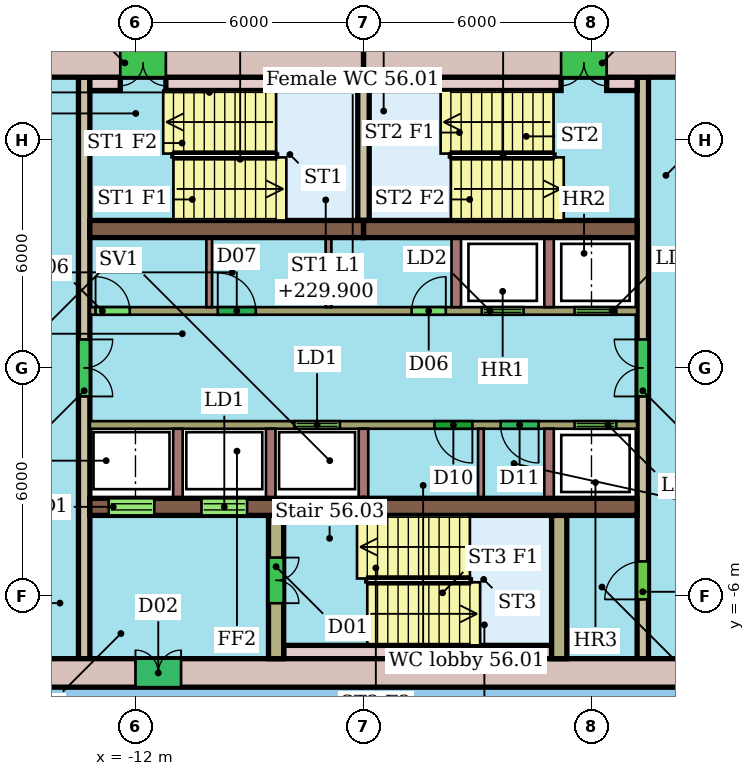
"""IFC4 building model, lengths in metres.
Left out: names, types, materials, properties, quantities, classifications, styles, units other than length and angle.
Written with IfcOpenShell. Run it as: python <this file> out.ifc"""

import sys

from ifc_helpers import new_model, si_unit, direction, frame, frame_2d, origin, place, context, subcontext, project, spatial, rectangle, extrude, element, fill, save


model = new_model("IFC4")
c1 = context("Model", 3, precision=1e-05, world=origin(), true_north=direction((0.0, 1.0)))
c2 = subcontext(c1, "Body", "Model", "MODEL_VIEW")
j1 = project(units=[si_unit("LENGTHUNIT", "METRE"), si_unit("PLANEANGLEUNIT", "RADIAN")], contexts=[c1])
p1 = place(None, origin())
s1 = spatial("IfcSite", under=j1, at=p1, CompositionType="ELEMENT")
p2 = place(p1, origin())
s2 = spatial("IfcBuilding", under=s1, at=p2, CompositionType="ELEMENT")
p3 = place(p2, frame((0.0, 0.0, 228.1)))
s3 = spatial("IfcBuildingStorey", under=s2, at=p3, CompositionType="ELEMENT", Elevation=228.1)
p4 = place(p3, frame((4.8, 8.025, 0.0), z_axis=(0.0, 0.0, 1.0), x_axis=(-1.0, 0.0, 0.0)))
e1 = element("IfcWall", 1, at=p4, inside=s3, PredefinedType="SHEAR", context=c2, shape_type="SweptSolid", body=[
    extrude(rectangle(XDim=10.8, YDim=0.75, at=frame_2d((5.4, 0.0))), origin(), (0.0, 0.0, 1.0), 3.3),
])
p5 = place(p4, frame((4.4, 0.0, 0.0)))
e2 = element("IfcOpeningElement", 2, at=p5, cuts=e1, PredefinedType="OPENING", context=c2, shape_type="SweptSolid", body=[
    extrude(rectangle(XDim=1.2, YDim=2.1, at=frame_2d((0.6, 1.05))), frame((0.0, 0.385, 0.0), z_axis=(0.0, -1.0, 0.0), x_axis=(1.0, 0.0, 0.0)), (0.0, 0.0, 1.0), 0.77),
])
p6 = place(p3, frame((-6.0, 8.025, 0.0), z_axis=(0.0, 0.0, 1.0), x_axis=(-1.0, 0.0, 0.0)))
e3 = element("IfcWall", 3, at=p6, inside=s3, PredefinedType="SHEAR", context=c2, shape_type="SweptSolid", body=[
    extrude(rectangle(XDim=10.8, YDim=0.75, at=frame_2d((5.4, 0.0))), origin(), (0.0, 0.0, 1.0), 3.3),
])
p7 = place(p6, frame((5.2, 0.0, 0.0)))
e4 = element("IfcOpeningElement", 4, at=p7, cuts=e3, PredefinedType="OPENING", context=c2, shape_type="SweptSolid", body=[
    extrude(rectangle(XDim=1.2, YDim=2.1, at=frame_2d((0.6, 1.05))), frame((0.0, 0.385, 0.0), z_axis=(0.0, -1.0, 0.0), x_axis=(1.0, 0.0, 0.0)), (0.0, 0.0, 1.0), 0.77),
])
p8 = place(p3, frame((-16.8, -8.025, 0.0), z_axis=(0.0, 0.0, 1.0), x_axis=(1.0, 0.0, 0.0)))
e5 = element("IfcWall", 5, at=p8, inside=s3, PredefinedType="SHEAR", context=c2, shape_type="SweptSolid", body=[
    extrude(rectangle(XDim=21.6, YDim=0.75, at=frame_2d((10.8, 0.0))), origin(), (0.0, 0.0, 1.0), 3.3),
])
p9 = place(p8, frame((4.8, 0.0, 0.0)))
e6 = element("IfcOpeningElement", 6, at=p9, cuts=e5, PredefinedType="OPENING", context=c2, shape_type="SweptSolid", body=[
    extrude(rectangle(XDim=1.2, YDim=2.1, at=frame_2d((0.6, 1.05))), frame((0.0, 0.385, 0.0), z_axis=(0.0, -1.0, 0.0), x_axis=(1.0, 0.0, 0.0)), (0.0, 0.0, 1.0), 0.77),
])
for number, where, z_axis, x_axis in (
    (7, (-13.2, 3.655, 0.0), (0.0, 0.0, 1.0), (1.0, 0.0, 0.0)),
    (8, (-6.0, 3.655, 0.0), (0.0, 0.0, 1.0), (1.0, 0.0, 0.0)),
):
    element("IfcWall", number, at=place(p3, frame(where, z_axis=z_axis, x_axis=x_axis)), inside=s3, PredefinedType="SHEAR", context=c2, shape_type="SweptSolid", body=[
        extrude(rectangle(XDim=7.2, YDim=0.45, at=frame_2d((3.6, 0.0))), origin(), (0.0, 0.0, 1.0), 3.3),
    ])
p10 = place(p3, frame((-13.2, -3.655, 0.0), z_axis=(0.0, 0.0, 1.0), x_axis=(1.0, 0.0, 0.0)))
e9 = element("IfcWall", 9, at=p10, inside=s3, PredefinedType="SHEAR", context=c2, shape_type="SweptSolid", body=[
    extrude(rectangle(XDim=7.2, YDim=0.45, at=frame_2d((3.6, 0.0))), origin(), (0.0, 0.0, 1.0), 3.3),
])
p11 = place(p10, frame((0.496, 0.0, 0.0)))
e10 = element("IfcOpeningElement", 10, at=p11, cuts=e9, PredefinedType="OPENING", context=c2, shape_type="SweptSolid", body=[
    extrude(rectangle(XDim=1.2, YDim=2.1, at=frame_2d((0.6, 1.05))), frame((0.0, 0.235, 0.0), z_axis=(0.0, -1.0, 0.0), x_axis=(1.0, 0.0, 0.0)), (0.0, 0.0, 1.0), 0.47),
])
p12 = place(p10, frame((2.938, 0.0, 0.0)))
e11 = element("IfcOpeningElement", 11, at=p12, cuts=e9, PredefinedType="OPENING", context=c2, shape_type="SweptSolid", body=[
    extrude(rectangle(XDim=1.2, YDim=2.1, at=frame_2d((0.6, 1.05))), frame((0.0, 0.235, 0.0), z_axis=(0.0, -1.0, 0.0), x_axis=(1.0, 0.0, 0.0)), (0.0, 0.0, 1.0), 0.47),
])
p13 = place(p3, frame((-6.0, -3.655, 0.0), z_axis=(0.0, 0.0, 1.0), x_axis=(1.0, 0.0, 0.0)))
e12 = element("IfcWall", 12, at=p13, inside=s3, PredefinedType="SHEAR", context=c2, shape_type="SweptSolid", body=[
    extrude(rectangle(XDim=7.2, YDim=0.45, at=frame_2d((3.6, 0.0))), origin(), (0.0, 0.0, 1.0), 3.3),
])
p14 = place(p3, frame((-13.35, 7.65, 0.0), z_axis=(0.0, 0.0, 1.0), x_axis=(0.0, -1.0, 0.0)))
e13 = element("IfcWall", 13, at=p14, inside=s3, PredefinedType="SHEAR", context=c2, shape_type="SweptSolid", body=[
    extrude(rectangle(XDim=15.3, YDim=0.3, at=frame_2d((7.65, 0.0))), origin(), (0.0, 0.0, 1.0), 3.3),
])
p15 = place(p14, frame((6.9, 0.0, 0.0)))
e14 = element("IfcOpeningElement", 14, at=p15, cuts=e13, PredefinedType="OPENING", context=c2, shape_type="SweptSolid", body=[
    extrude(rectangle(XDim=1.5, YDim=2.1, at=frame_2d((0.75, 1.05))), frame((0.0, 0.16, 0.0), z_axis=(0.0, -1.0, 0.0), x_axis=(1.0, 0.0, 0.0)), (0.0, 0.0, 1.0), 0.32),
])
p16 = place(p3, frame((1.35, -7.65, 0.0), z_axis=(0.0, 0.0, 1.0), x_axis=(0.0, 1.0, 0.0)))
e15 = element("IfcWall", 15, at=p16, inside=s3, PredefinedType="SHEAR", context=c2, shape_type="SweptSolid", body=[
    extrude(rectangle(XDim=15.3, YDim=0.3, at=frame_2d((7.65, 0.0))), origin(), (0.0, 0.0, 1.0), 3.3),
])
p17 = place(p16, frame((1.56, 0.0, 0.0)))
e16 = element("IfcOpeningElement", 16, at=p17, cuts=e15, PredefinedType="OPENING", context=c2, shape_type="SweptSolid", body=[
    extrude(rectangle(XDim=1.0, YDim=2.1, at=frame_2d((0.5, 1.05))), frame((0.0, 0.16, 0.0), z_axis=(0.0, -1.0, 0.0), x_axis=(1.0, 0.0, 0.0)), (0.0, 0.0, 1.0), 0.32),
])
p18 = place(p16, frame((6.9, 0.0, 0.0)))
e17 = element("IfcOpeningElement", 17, at=p18, cuts=e15, PredefinedType="OPENING", context=c2, shape_type="SweptSolid", body=[
    extrude(rectangle(XDim=1.5, YDim=2.1, at=frame_2d((0.75, 1.05))), frame((0.0, 0.16, 0.0), z_axis=(0.0, -1.0, 0.0), x_axis=(1.0, 0.0, 0.0)), (0.0, 0.0, 1.0), 0.32),
])
p19 = place(p3, frame((-13.2, 1.5, 0.0), z_axis=(0.0, 0.0, 1.0), x_axis=(1.0, 0.0, 0.0)))
e18 = element("IfcWall", 18, at=p19, inside=s3, PredefinedType="SHEAR", context=c2, shape_type="SweptSolid", body=[
    extrude(rectangle(XDim=14.4, YDim=0.2, at=frame_2d((7.2, 0.0))), origin(), (0.0, 0.0, 1.0), 3.3),
])
p20 = place(p19, frame((10.312, 0.0, 0.0)))
e19 = element("IfcOpeningElement", 19, at=p20, cuts=e18, PredefinedType="OPENING", context=c2, shape_type="SweptSolid", body=[
    extrude(rectangle(XDim=1.1, YDim=2.1, at=frame_2d((0.55, 1.05))), frame((0.0, 0.11, 0.0), z_axis=(0.0, -1.0, 0.0), x_axis=(1.0, 0.0, 0.0)), (0.0, 0.0, 1.0), 0.22),
])
p21 = place(p19, frame((12.754, 0.0, 0.0)))
e20 = element("IfcOpeningElement", 20, at=p21, cuts=e18, PredefinedType="OPENING", context=c2, shape_type="SweptSolid", body=[
    extrude(rectangle(XDim=1.1, YDim=2.1, at=frame_2d((0.55, 1.05))), frame((0.0, 0.11, 0.0), z_axis=(0.0, -1.0, 0.0), x_axis=(1.0, 0.0, 0.0)), (0.0, 0.0, 1.0), 0.22),
])
p22 = place(p19, frame((0.15, 0.0, 0.0)))
e21 = element("IfcOpeningElement", 21, at=p22, cuts=e18, PredefinedType="OPENING", context=c2, shape_type="SweptSolid", body=[
    extrude(rectangle(XDim=0.9, YDim=2.1, at=frame_2d((0.45, 1.05))), frame((0.0, 0.11, 0.0), z_axis=(0.0, -1.0, 0.0), x_axis=(1.0, 0.0, 0.0)), (0.0, 0.0, 1.0), 0.22),
])
p23 = place(p19, frame((3.365, 0.0, 0.0)))
e22 = element("IfcOpeningElement", 22, at=p23, cuts=e18, PredefinedType="OPENING", context=c2, shape_type="SweptSolid", body=[
    extrude(rectangle(XDim=1.0, YDim=2.1, at=frame_2d((0.5, 1.05))), frame((0.0, 0.11, 0.0), z_axis=(0.0, -1.0, 0.0), x_axis=(1.0, 0.0, 0.0)), (0.0, 0.0, 1.0), 0.22),
])
p24 = place(p19, frame((8.467, 0.0, 0.0)))
e23 = element("IfcOpeningElement", 23, at=p24, cuts=e18, PredefinedType="OPENING", context=c2, shape_type="SweptSolid", body=[
    extrude(rectangle(XDim=0.9, YDim=2.1, at=frame_2d((0.45, 1.05))), frame((0.0, 0.11, 0.0), z_axis=(0.0, -1.0, 0.0), x_axis=(1.0, 0.0, 0.0)), (0.0, 0.0, 1.0), 0.22),
])
p25 = place(p3, frame((1.2, -1.5, 0.0), z_axis=(0.0, 0.0, 1.0), x_axis=(-1.0, 0.0, 0.0)))
e24 = element("IfcWall", 24, at=p25, inside=s3, PredefinedType="SHEAR", context=c2, shape_type="SweptSolid", body=[
    extrude(rectangle(XDim=14.4, YDim=0.2, at=frame_2d((7.2, 0.0))), origin(), (0.0, 0.0, 1.0), 3.3),
])
p26 = place(p25, frame((7.821, 0.0, 0.0)))
e25 = element("IfcOpeningElement", 25, at=p26, cuts=e24, PredefinedType="OPENING", context=c2, shape_type="SweptSolid", body=[
    extrude(rectangle(XDim=1.2, YDim=2.1, at=frame_2d((0.6, 1.05))), frame((0.0, 0.11, 0.0), z_axis=(0.0, -1.0, 0.0), x_axis=(1.0, 0.0, 0.0)), (0.0, 0.0, 1.0), 0.22),
])
p27 = place(p25, frame((0.546, 0.0, 0.0)))
e26 = element("IfcOpeningElement", 26, at=p27, cuts=e24, PredefinedType="OPENING", context=c2, shape_type="SweptSolid", body=[
    extrude(rectangle(XDim=1.1, YDim=2.1, at=frame_2d((0.55, 1.05))), frame((0.0, 0.11, 0.0), z_axis=(0.0, -1.0, 0.0), x_axis=(1.0, 0.0, 0.0)), (0.0, 0.0, 1.0), 0.22),
])
p28 = place(p25, frame((4.335, 0.0, 0.0)))
e27 = element("IfcOpeningElement", 27, at=p28, cuts=e24, PredefinedType="OPENING", context=c2, shape_type="SweptSolid", body=[
    extrude(rectangle(XDim=1.0, YDim=2.1, at=frame_2d((0.5, 1.05))), frame((0.0, 0.11, 0.0), z_axis=(0.0, -1.0, 0.0), x_axis=(1.0, 0.0, 0.0)), (0.0, 0.0, 1.0), 0.22),
])
p29 = place(p25, frame((2.592, 0.0, 0.0)))
e28 = element("IfcOpeningElement", 28, at=p29, cuts=e24, PredefinedType="OPENING", context=c2, shape_type="SweptSolid", body=[
    extrude(rectangle(XDim=1.0, YDim=2.1, at=frame_2d((0.5, 1.05))), frame((0.0, 0.11, 0.0), z_axis=(0.0, -1.0, 0.0), x_axis=(1.0, 0.0, 0.0)), (0.0, 0.0, 1.0), 0.22),
])
p30 = place(p3, frame((-8.3, -3.88, 0.0), z_axis=(0.0, 0.0, 1.0), x_axis=(0.0, -1.0, 0.0)))
e29 = element("IfcWall", 29, at=p30, inside=s3, PredefinedType="SHEAR", context=c2, shape_type="SweptSolid", body=[
    extrude(rectangle(XDim=3.77, YDim=0.4, at=frame_2d((1.885, 0.0))), origin(), (0.0, 0.0, 1.0), 3.3),
])
p31 = place(p30, frame((1.11, 0.0, 0.0)))
e30 = element("IfcOpeningElement", 30, at=p31, cuts=e29, PredefinedType="OPENING", context=c2, shape_type="SweptSolid", body=[
    extrude(rectangle(XDim=1.2, YDim=2.1, at=frame_2d((0.6, 1.05))), frame((0.0, 0.21, 0.0), z_axis=(0.0, -1.0, 0.0), x_axis=(1.0, 0.0, 0.0)), (0.0, 0.0, 1.0), 0.42),
])
p32 = place(p3, frame((-0.85, -3.88, 0.0), z_axis=(0.0, 0.0, 1.0), x_axis=(0.0, -1.0, 0.0)))
e31 = element("IfcWall", 31, at=p32, inside=s3, PredefinedType="SHEAR", context=c2, shape_type="SweptSolid", body=[
    extrude(rectangle(XDim=3.77, YDim=0.4, at=frame_2d((1.885, 0.0))), origin(), (0.0, 0.0, 1.0), 3.3),
])
p33 = place(p3, frame((-6.0, 3.88, 0.0), z_axis=(0.0, 0.0, 1.0), x_axis=(0.0, 1.0, 0.0)))
e32 = element("IfcWall", 32, at=p33, inside=s3, PredefinedType="SHEAR", context=c2, shape_type="SweptSolid", body=[
    extrude(rectangle(XDim=3.77, YDim=0.3, at=frame_2d((1.885, 0.0))), origin(), (0.0, 0.0, 1.0), 3.3),
])
p34 = place(p3, frame((-13.2, 7.475, 0.0), z_axis=(0.0, 0.0, 1.0), x_axis=(1.0, 0.0, 0.0)))
e33 = element("IfcWall", 33, at=p34, inside=s3, PredefinedType="SHEAR", context=c2, shape_type="SweptSolid", body=[
    extrude(rectangle(XDim=0.8, YDim=0.35, at=frame_2d((0.4, 0.0))), origin(), (0.0, 0.0, 1.0), 3.3),
])
for number, where, z_axis, x_axis in (
    (34, (-11.2, 7.475, 0.0), (0.0, 0.0, 1.0), (1.0, 0.0, 0.0)),
    (35, (-5.85, 7.475, 0.0), (0.0, 0.0, 1.0), (1.0, 0.0, 0.0)),
):
    element("IfcWall", number, at=place(p3, frame(where, z_axis=z_axis, x_axis=x_axis)), inside=s3, PredefinedType="SHEAR", context=c2, shape_type="SweptSolid", body=[
        extrude(rectangle(XDim=5.05, YDim=0.35, at=frame_2d((2.525, 0.0))), origin(), (0.0, 0.0, 1.0), 3.3),
    ])
p35 = place(p3, frame((0.4, 7.475, 0.0), z_axis=(0.0, 0.0, 1.0), x_axis=(1.0, 0.0, 0.0)))
e36 = element("IfcWall", 36, at=p35, inside=s3, PredefinedType="SHEAR", context=c2, shape_type="SweptSolid", body=[
    extrude(rectangle(XDim=0.8, YDim=0.35, at=frame_2d((0.4, 0.0))), origin(), (0.0, 0.0, 1.0), 3.3),
])
p36 = place(p3, frame((-8.1, -7.475, 0.0), z_axis=(0.0, 0.0, 1.0), x_axis=(1.0, 0.0, 0.0)))
e37 = element("IfcWall", 37, at=p36, inside=s3, PredefinedType="SHEAR", context=c2, shape_type="SweptSolid", body=[
    extrude(rectangle(XDim=7.05, YDim=0.35, at=frame_2d((3.525, 0.0))), origin(), (0.0, 0.0, 1.0), 3.3),
])
for number, where, z_axis, x_axis in (
    (38, (-3.558, 1.6, 0.0), (0.0, 0.0, 1.0), (0.0, 1.0, 0.0)),
    (39, (-1.117, 1.6, 0.0), (0.0, 0.0, 1.0), (0.0, 1.0, 0.0)),
):
    element("IfcWall", number, at=place(p3, frame(where, z_axis=z_axis, x_axis=x_axis)), inside=s3, PredefinedType="SHEAR", context=c2, shape_type="SweptSolid", body=[
        extrude(rectangle(XDim=1.83, YDim=0.25, at=frame_2d((0.915, 0.0))), origin(), (0.0, 0.0, 1.0), 3.3),
    ])
for number, where, z_axis, x_axis in (
    (40, (-10.06, 1.6, 0.0), (0.0, 0.0, 1.0), (0.0, 1.0, 0.0)),
    (41, (-6.919, 1.6, 0.0), (0.0, 0.0, 1.0), (0.0, 1.0, 0.0)),
):
    element("IfcWall", number, at=place(p3, frame(where, z_axis=z_axis, x_axis=x_axis)), inside=s3, PredefinedType="PARTITIONING", context=c2, shape_type="SweptSolid", body=[
        extrude(rectangle(XDim=1.83, YDim=0.15, at=frame_2d((0.915, 0.0))), origin(), (0.0, 0.0, 1.0), 3.3),
    ])
for number, where, z_axis, x_axis in (
    (42, (-10.883, -1.6, 0.0), (0.0, 0.0, 1.0), (0.0, -1.0, 0.0)),
    (43, (-8.442, -1.6, 0.0), (0.0, 0.0, 1.0), (0.0, -1.0, 0.0)),
    (44, (-6.0, -1.6, 0.0), (0.0, 0.0, 1.0), (0.0, -1.0, 0.0)),
    (45, (-1.117, -1.6, 0.0), (0.0, 0.0, 1.0), (0.0, -1.0, 0.0)),
):
    element("IfcWall", number, at=place(p3, frame(where, z_axis=z_axis, x_axis=x_axis)), inside=s3, PredefinedType="SHEAR", context=c2, shape_type="SweptSolid", body=[
        extrude(rectangle(XDim=1.83, YDim=0.25, at=frame_2d((0.915, 0.0))), origin(), (0.0, 0.0, 1.0), 3.3),
    ])
p37 = place(p3, frame((-2.91, -1.6, 0.0), z_axis=(0.0, 0.0, 1.0), x_axis=(0.0, -1.0, 0.0)))
e46 = element("IfcWall", 46, at=p37, inside=s3, PredefinedType="PARTITIONING", context=c2, shape_type="SweptSolid", body=[
    extrude(rectangle(XDim=1.83, YDim=0.15, at=frame_2d((0.915, 0.0))), origin(), (0.0, 0.0, 1.0), 3.3),
])
p38 = place(p5, origin())
e47 = element("IfcDoor", 47, at=p38, inside=s3, OperationType="DOUBLE_DOOR_SINGLE_SWING", PredefinedType="NOTDEFINED", context=c2, shape_type="SweptSolid", body=[
    extrude(rectangle(XDim=1.2, YDim=2.1, at=frame_2d((0.6, 1.05))), frame((0.0, 0.025, 0.0), z_axis=(0.0, -1.0, 0.0), x_axis=(1.0, 0.0, 0.0)), (0.0, 0.0, 1.0), 0.05),
])
fill(e2, e47)
p39 = place(p7, origin())
e48 = element("IfcDoor", 48, at=p39, inside=s3, OperationType="DOUBLE_DOOR_SINGLE_SWING", PredefinedType="NOTDEFINED", context=c2, shape_type="SweptSolid", body=[
    extrude(rectangle(XDim=1.2, YDim=2.1, at=frame_2d((0.6, 1.05))), frame((0.0, 0.025, 0.0), z_axis=(0.0, -1.0, 0.0), x_axis=(1.0, 0.0, 0.0)), (0.0, 0.0, 1.0), 0.05),
])
fill(e4, e48)
p40 = place(p9, origin())
e49 = element("IfcDoor", 49, at=p40, inside=s3, OperationType="DOUBLE_DOOR_SINGLE_SWING", PredefinedType="NOTDEFINED", context=c2, shape_type="SweptSolid", body=[
    extrude(rectangle(XDim=1.2, YDim=2.1, at=frame_2d((0.6, 1.05))), frame((0.0, 0.025, 0.0), z_axis=(0.0, -1.0, 0.0), x_axis=(1.0, 0.0, 0.0)), (0.0, 0.0, 1.0), 0.05),
])
fill(e6, e49)
p41 = place(p11, origin())
e50 = element("IfcDoor", 50, at=p41, inside=s3, OperationType="DOUBLE_DOOR_SLIDING", PredefinedType="NOTDEFINED", context=c2, shape_type="SweptSolid", body=[
    extrude(rectangle(XDim=1.2, YDim=2.1, at=frame_2d((0.6, 1.05))), frame((0.0, 0.025, 0.0), z_axis=(0.0, -1.0, 0.0), x_axis=(1.0, 0.0, 0.0)), (0.0, 0.0, 1.0), 0.05),
])
fill(e10, e50)
p42 = place(p12, origin())
e51 = element("IfcDoor", 51, at=p42, inside=s3, OperationType="DOUBLE_DOOR_SLIDING", PredefinedType="NOTDEFINED", context=c2, shape_type="SweptSolid", body=[
    extrude(rectangle(XDim=1.2, YDim=2.1, at=frame_2d((0.6, 1.05))), frame((0.0, 0.025, 0.0), z_axis=(0.0, -1.0, 0.0), x_axis=(1.0, 0.0, 0.0)), (0.0, 0.0, 1.0), 0.05),
])
fill(e11, e51)
p43 = place(p15, origin())
e52 = element("IfcDoor", 52, at=p43, inside=s3, OperationType="DOUBLE_DOOR_SINGLE_SWING", PredefinedType="NOTDEFINED", context=c2, shape_type="SweptSolid", body=[
    extrude(rectangle(XDim=1.5, YDim=2.1, at=frame_2d((0.75, 1.05))), frame((0.0, 0.025, 0.0), z_axis=(0.0, -1.0, 0.0), x_axis=(1.0, 0.0, 0.0)), (0.0, 0.0, 1.0), 0.05),
])
fill(e14, e52)
p44 = place(p17, origin())
e53 = element("IfcDoor", 53, at=p44, inside=s3, OperationType="SINGLE_SWING_LEFT", PredefinedType="NOTDEFINED", context=c2, shape_type="SweptSolid", body=[
    extrude(rectangle(XDim=1.0, YDim=2.1, at=frame_2d((0.5, 1.05))), frame((0.0, 0.025, 0.0), z_axis=(0.0, -1.0, 0.0), x_axis=(1.0, 0.0, 0.0)), (0.0, 0.0, 1.0), 0.05),
])
fill(e16, e53)
p45 = place(p18, origin())
e54 = element("IfcDoor", 54, at=p45, inside=s3, OperationType="DOUBLE_DOOR_SINGLE_SWING", PredefinedType="NOTDEFINED", context=c2, shape_type="SweptSolid", body=[
    extrude(rectangle(XDim=1.5, YDim=2.1, at=frame_2d((0.75, 1.05))), frame((0.0, 0.025, 0.0), z_axis=(0.0, -1.0, 0.0), x_axis=(1.0, 0.0, 0.0)), (0.0, 0.0, 1.0), 0.05),
])
fill(e17, e54)
p46 = place(p20, origin())
e55 = element("IfcDoor", 55, at=p46, inside=s3, OperationType="DOUBLE_DOOR_SLIDING", PredefinedType="NOTDEFINED", context=c2, shape_type="SweptSolid", body=[
    extrude(rectangle(XDim=1.1, YDim=2.1, at=frame_2d((0.55, 1.05))), frame((0.0, 0.025, 0.0), z_axis=(0.0, -1.0, 0.0), x_axis=(1.0, 0.0, 0.0)), (0.0, 0.0, 1.0), 0.05),
])
fill(e19, e55)
p47 = place(p21, origin())
e56 = element("IfcDoor", 56, at=p47, inside=s3, OperationType="DOUBLE_DOOR_SLIDING", PredefinedType="NOTDEFINED", context=c2, shape_type="SweptSolid", body=[
    extrude(rectangle(XDim=1.1, YDim=2.1, at=frame_2d((0.55, 1.05))), frame((0.0, 0.025, 0.0), z_axis=(0.0, -1.0, 0.0), x_axis=(1.0, 0.0, 0.0)), (0.0, 0.0, 1.0), 0.05),
])
fill(e20, e56)
p48 = place(p22, origin())
e57 = element("IfcDoor", 57, at=p48, inside=s3, OperationType="SINGLE_SWING_LEFT", PredefinedType="NOTDEFINED", context=c2, shape_type="SweptSolid", body=[
    extrude(rectangle(XDim=0.9, YDim=2.1, at=frame_2d((0.45, 1.05))), frame((0.0, 0.025, 0.0), z_axis=(0.0, -1.0, 0.0), x_axis=(1.0, 0.0, 0.0)), (0.0, 0.0, 1.0), 0.05),
])
fill(e21, e57)
p49 = place(p23, origin())
e58 = element("IfcDoor", 58, at=p49, inside=s3, OperationType="SINGLE_SWING_LEFT", PredefinedType="NOTDEFINED", context=c2, shape_type="SweptSolid", body=[
    extrude(rectangle(XDim=1.0, YDim=2.1, at=frame_2d((0.5, 1.05))), frame((0.0, 0.025, 0.0), z_axis=(0.0, -1.0, 0.0), x_axis=(1.0, 0.0, 0.0)), (0.0, 0.0, 1.0), 0.05),
])
fill(e22, e58)
p50 = place(p24, origin())
e59 = element("IfcDoor", 59, at=p50, inside=s3, OperationType="SINGLE_SWING_RIGHT", PredefinedType="NOTDEFINED", context=c2, shape_type="SweptSolid", body=[
    extrude(rectangle(XDim=0.9, YDim=2.1, at=frame_2d((0.45, 1.05))), frame((0.0, 0.025, 0.0), z_axis=(0.0, -1.0, 0.0), x_axis=(1.0, 0.0, 0.0)), (0.0, 0.0, 1.0), 0.05),
])
fill(e23, e59)
p51 = place(p26, origin())
e60 = element("IfcDoor", 60, at=p51, inside=s3, OperationType="DOUBLE_DOOR_SLIDING", PredefinedType="NOTDEFINED", context=c2, shape_type="SweptSolid", body=[
    extrude(rectangle(XDim=1.2, YDim=2.1, at=frame_2d((0.6, 1.05))), frame((0.0, 0.025, 0.0), z_axis=(0.0, -1.0, 0.0), x_axis=(1.0, 0.0, 0.0)), (0.0, 0.0, 1.0), 0.05),
])
fill(e25, e60)
p52 = place(p27, origin())
e61 = element("IfcDoor", 61, at=p52, inside=s3, OperationType="DOUBLE_DOOR_SLIDING", PredefinedType="NOTDEFINED", context=c2, shape_type="SweptSolid", body=[
    extrude(rectangle(XDim=1.1, YDim=2.1, at=frame_2d((0.55, 1.05))), frame((0.0, 0.025, 0.0), z_axis=(0.0, -1.0, 0.0), x_axis=(1.0, 0.0, 0.0)), (0.0, 0.0, 1.0), 0.05),
])
fill(e26, e61)
p53 = place(p28, origin())
e62 = element("IfcDoor", 62, at=p53, inside=s3, OperationType="SINGLE_SWING_LEFT", PredefinedType="NOTDEFINED", context=c2, shape_type="SweptSolid", body=[
    extrude(rectangle(XDim=1.0, YDim=2.1, at=frame_2d((0.5, 1.05))), frame((0.0, 0.025, 0.0), z_axis=(0.0, -1.0, 0.0), x_axis=(1.0, 0.0, 0.0)), (0.0, 0.0, 1.0), 0.05),
])
fill(e27, e62)
p54 = place(p29, origin())
e63 = element("IfcDoor", 63, at=p54, inside=s3, OperationType="SINGLE_SWING_LEFT", PredefinedType="NOTDEFINED", context=c2, shape_type="SweptSolid", body=[
    extrude(rectangle(XDim=1.0, YDim=2.1, at=frame_2d((0.5, 1.05))), frame((0.0, 0.025, 0.0), z_axis=(0.0, -1.0, 0.0), x_axis=(1.0, 0.0, 0.0)), (0.0, 0.0, 1.0), 0.05),
])
fill(e28, e63)
p55 = place(p31, origin())
e64 = element("IfcDoor", 64, at=p55, inside=s3, OperationType="DOUBLE_DOOR_SINGLE_SWING", PredefinedType="NOTDEFINED", context=c2, shape_type="SweptSolid", body=[
    extrude(rectangle(XDim=1.2, YDim=2.1, at=frame_2d((0.6, 1.05))), frame((0.0, 0.025, 0.0), z_axis=(0.0, -1.0, 0.0), x_axis=(1.0, 0.0, 0.0)), (0.0, 0.0, 1.0), 0.05),
])
fill(e30, e64)
save(model, sys.argv[1])
